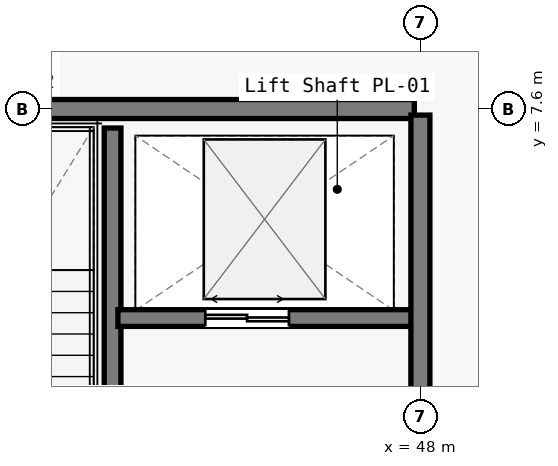
"""IFC4 building model, lengths in metres.
Left out: names, types, materials, properties, quantities, classifications, styles, units other than length and angle.
Written with IfcOpenShell. Run it as: python <this file> out.ifc"""

import sys

from ifc_helpers import new_model, si_unit, direction, frame, frame_2d, origin, place, context, subcontext, project, spatial, rectangle, extrude, element, fill, save


model = new_model("IFC4")
c1 = context("Model", 3, precision=1e-05, world=origin(), true_north=direction((0.0, 1.0)))
c2 = subcontext(c1, "Body", "Model", "MODEL_VIEW")
j1 = project(units=[si_unit("LENGTHUNIT", "METRE"), si_unit("PLANEANGLEUNIT", "RADIAN")], contexts=[c1])
p1 = place(None, origin())
s1 = spatial("IfcSite", under=j1, at=p1, CompositionType="ELEMENT")
p2 = place(p1, origin())
s2 = spatial("IfcBuilding", under=s1, at=p2, CompositionType="ELEMENT")
p3 = place(p2, frame((0.0, 0.0, 5.4)))
s3 = spatial("IfcBuildingStorey", under=s2, at=p3, CompositionType="ELEMENT", Elevation=5.4)
p4 = place(p3, frame((40.15, 7.6, 0.0), z_axis=(0.0, 0.0, 1.0), x_axis=(1.0, 0.0, 0.0)))
e1 = element("IfcWall", 1, at=p4, inside=s3, PredefinedType="SOLIDWALL", context=c2, shape_type="SweptSolid", body=[
    extrude(rectangle(XDim=7.77, YDim=0.25, at=frame_2d((3.885, 0.0))), origin(), (0.0, 0.0, 1.0), 3.4),
])
p5 = place(p3, frame((43.95, 0.25, 0.0), z_axis=(0.0, 0.0, 1.0), x_axis=(0.0, 1.0, 0.0)))
e2 = element("IfcWall", 2, at=p5, inside=s3, PredefinedType="SOLIDWALL", context=c2, shape_type="SweptSolid", body=[
    extrude(rectangle(XDim=7.1, YDim=0.22, at=frame_2d((3.55, 0.0))), origin(), (0.0, 0.0, 1.0), 4.51),
])
p6 = place(p5, frame((0.35, 0.0, 0.0)))
e3 = element("IfcOpeningElement", 3, at=p6, cuts=e2, PredefinedType="OPENING", context=c2, shape_type="SweptSolid", body=[
    extrude(rectangle(XDim=1.2, YDim=2.15, at=frame_2d((0.6, 1.075))), frame((0.0, 0.12, 0.0), z_axis=(0.0, -1.0, 0.0), x_axis=(1.0, 0.0, 0.0)), (0.0, 0.0, 1.0), 0.24),
])
p7 = place(p3, frame((44.02, 4.85, 0.0), z_axis=(0.0, 0.0, 1.0), x_axis=(1.0, 0.0, 0.0)))
e4 = element("IfcWall", 4, at=p7, inside=s3, PredefinedType="SOLIDWALL", context=c2, shape_type="SweptSolid", body=[
    extrude(rectangle(XDim=3.93, YDim=0.22, at=frame_2d((1.965, 0.0))), origin(), (0.0, 0.0, 1.0), 3.945),
])
p8 = place(p7, frame((1.15, 0.0, 0.0)))
e5 = element("IfcOpeningElement", 5, at=p8, cuts=e4, PredefinedType="OPENING", context=c2, shape_type="SweptSolid", body=[
    extrude(rectangle(XDim=1.1, YDim=2.2, at=frame_2d((0.55, 1.1))), frame((0.0, 0.12, 0.0), z_axis=(0.0, -1.0, 0.0), x_axis=(1.0, 0.0, 0.0)), (0.0, 0.0, 1.0), 0.24),
])
p9 = place(p3, frame((48.0, 0.08, 0.0), z_axis=(0.0, 0.0, 1.0), x_axis=(0.0, 1.0, 0.0)))
e6 = element("IfcWall", 6, at=p9, inside=s3, PredefinedType="SOLIDWALL", context=c2, shape_type="SweptSolid", body=[
    extrude(rectangle(XDim=7.44, YDim=0.25, at=frame_2d((3.72, 0.0))), origin(), (0.0, 0.0, 1.0), 3.4),
])
p10 = place(p9, frame((2.27, 0.0, 0.0)))
e7 = element("IfcOpeningElement", 7, at=p10, cuts=e6, PredefinedType="OPENING", context=c2, shape_type="SweptSolid", body=[
    extrude(rectangle(XDim=1.35, YDim=2.2, at=frame_2d((0.675, 1.1))), frame((0.0, 0.135, 0.0), z_axis=(0.0, -1.0, 0.0), x_axis=(1.0, 0.0, 0.0)), (0.0, 0.0, 1.0), 0.27),
])
p11 = place(p8, origin())
e8 = element("IfcDoor", 8, at=p11, inside=s3, OperationType="DOUBLE_DOOR_SLIDING", PredefinedType="DOOR", context=c2, shape_type="SweptSolid", body=[
    extrude(rectangle(XDim=1.1, YDim=2.2, at=frame_2d((0.55, 1.1))), frame((0.0, 0.025, 0.0), z_axis=(0.0, -1.0, 0.0), x_axis=(1.0, 0.0, 0.0)), (0.0, 0.0, 1.0), 0.05),
])
fill(e5, e8)
save(model, sys.argv[1])
